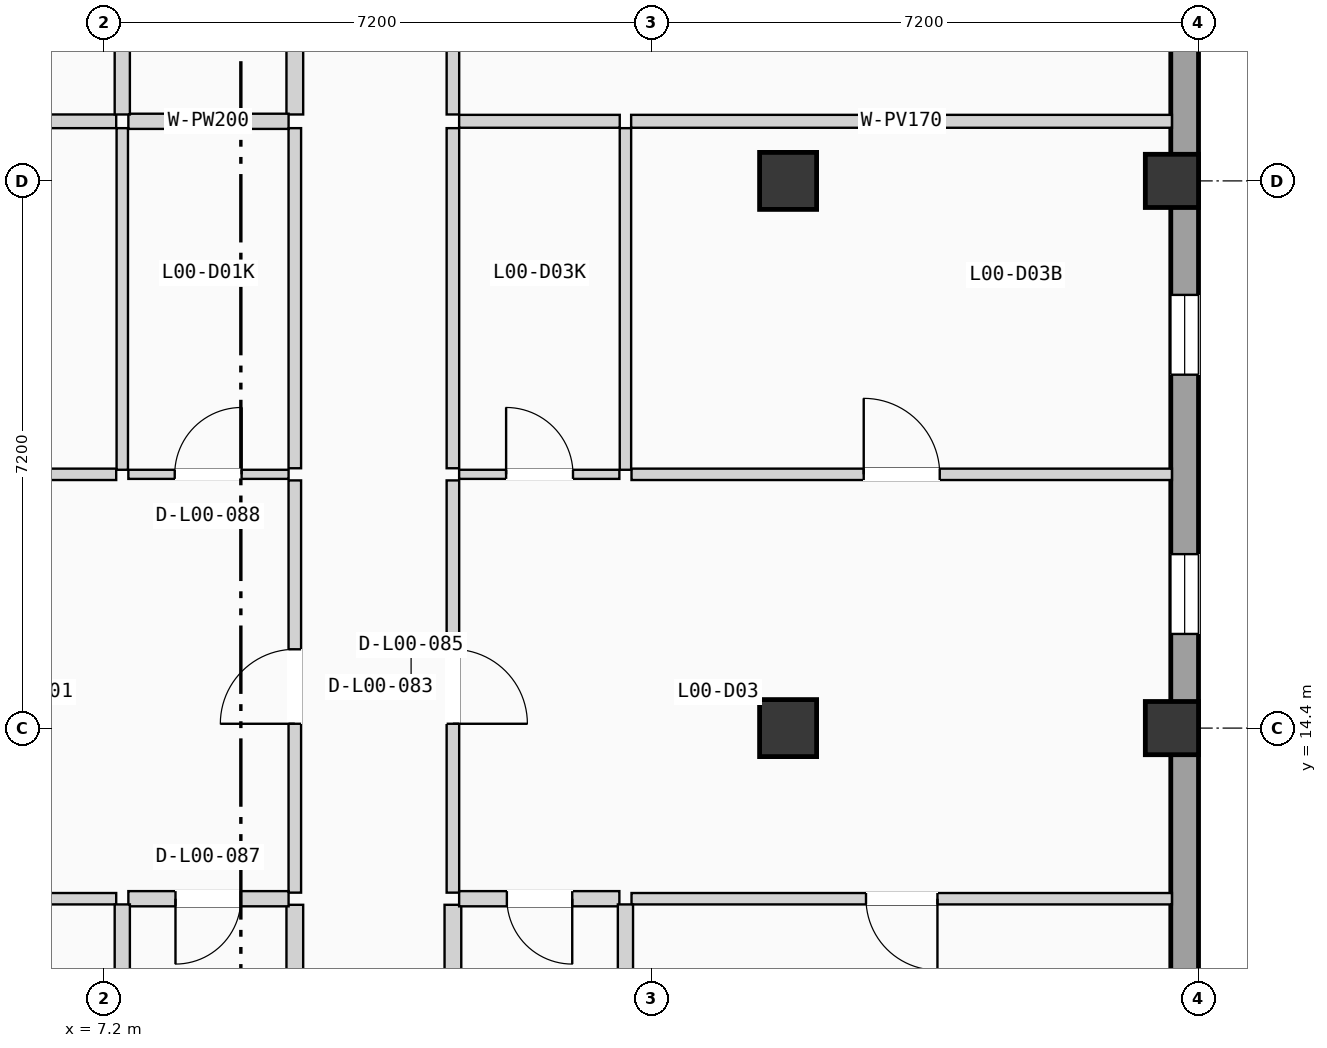
"""IFC4 building model, lengths in metres.
Left out: names, types, materials, properties, quantities, classifications, styles, units other than length and angle.
Written with IfcOpenShell. Run it as: python <this file> out.ifc"""

import sys

from ifc_helpers import new_model, si_unit, direction, frame, frame_2d, origin, origin_2d, place, context, subcontext, project, spatial, rectangle, extrude, element, fill, save


model = new_model("IFC4")
c1 = context("Model", 3, precision=1e-05, world=origin(), true_north=direction((0.0, 1.0)))
c2 = subcontext(c1, "Body", "Model", "MODEL_VIEW")
j1 = project(units=[si_unit("LENGTHUNIT", "METRE"), si_unit("PLANEANGLEUNIT", "RADIAN")], contexts=[c1])
p1 = place(None, origin())
s1 = spatial("IfcSite", under=j1, at=p1, CompositionType="ELEMENT")
p2 = place(p1, origin())
s2 = spatial("IfcBuilding", under=s1, at=p2, CompositionType="ELEMENT")
p3 = place(p2, origin())
s3 = spatial("IfcBuildingStorey", under=s2, at=p3, CompositionType="ELEMENT", Elevation=0.0)
for number, where, z_axis, x_axis in (
    (1, (16.2, 14.4, 0.0), (0.0, 0.0, 1.0), (1.0, 0.0, 0.0)),
    (2, (16.2, 21.6, 0.0), (0.0, 0.0, 1.0), (1.0, 0.0, 0.0)),
):
    element("IfcColumn", number, at=place(p3, frame(where, z_axis=z_axis, x_axis=x_axis)), inside=s3, PredefinedType="COLUMN", context=c2, shape_type="SweptSolid", body=[
        extrude(rectangle(XDim=0.75, YDim=0.75, at=origin_2d()), origin(), (0.0, 0.0, 1.0), 4.9),
    ])
for number, where, z_axis, x_axis in (
    (3, (21.25, 14.4, 0.0), (0.0, 0.0, 1.0), (1.0, 0.0, 0.0)),
    (4, (21.25, 21.6, 0.0), (0.0, 0.0, 1.0), (1.0, 0.0, 0.0)),
):
    element("IfcColumn", number, at=place(p3, frame(where, z_axis=z_axis, x_axis=x_axis)), inside=s3, PredefinedType="COLUMN", context=c2, shape_type="SweptSolid", body=[
        extrude(rectangle(XDim=0.7, YDim=0.7, at=origin_2d()), origin(), (0.0, 0.0, 1.0), 4.9),
    ])
p4 = place(p3, frame((21.417, 0.365, 0.0), z_axis=(0.0, 0.0, 1.0), x_axis=(0.0, 1.0, 0.0)))
e5 = element("IfcWall", 5, at=p4, inside=s3, PredefinedType="SOLIDWALL", context=c2, shape_type="SweptSolid", body=[
    extrude(rectangle(XDim=49.67, YDim=0.365, at=frame_2d((24.835, 0.0))), origin(), (0.0, 0.0, 1.0), 4.64),
])
p5 = place(p4, frame((23.935, 0.0, 0.0)))
e6 = element("IfcOpeningElement", 6, at=p5, cuts=e5, PredefinedType="OPENING", context=c2, shape_type="SweptSolid", body=[
    extrude(rectangle(XDim=1.8, YDim=2.35, at=frame_2d((0.9, 1.175))), frame((0.0, 0.192, 0.0), z_axis=(0.0, -1.0, 0.0), x_axis=(1.0, 0.0, 0.0)), (0.0, 0.0, 1.0), 0.385),
])
p6 = place(p4, frame((15.274, 0.0, 0.9)))
e7 = element("IfcOpeningElement", 7, at=p6, cuts=e5, PredefinedType="OPENING", context=c2, shape_type="SweptSolid", body=[
    extrude(rectangle(XDim=1.05, YDim=1.35, at=frame_2d((0.525, 0.675))), frame((0.0, 0.192, 0.0), z_axis=(0.0, -1.0, 0.0), x_axis=(1.0, 0.0, 0.0)), (0.0, 0.0, 1.0), 0.385),
])
p7 = place(p4, frame((8.947, 0.0, 0.9)))
e8 = element("IfcOpeningElement", 8, at=p7, cuts=e5, PredefinedType="OPENING", context=c2, shape_type="SweptSolid", body=[
    extrude(rectangle(XDim=1.05, YDim=1.5, at=frame_2d((0.525, 0.75))), frame((0.0, 0.192, 0.0), z_axis=(0.0, -1.0, 0.0), x_axis=(1.0, 0.0, 0.0)), (0.0, 0.0, 1.0), 0.385),
])
p8 = place(p4, frame((18.685, 0.0, 0.9)))
e9 = element("IfcOpeningElement", 9, at=p8, cuts=e5, PredefinedType="OPENING", context=c2, shape_type="SweptSolid", body=[
    extrude(rectangle(XDim=1.05, YDim=1.65, at=frame_2d((0.525, 0.825))), frame((0.0, 0.192, 0.0), z_axis=(0.0, -1.0, 0.0), x_axis=(1.0, 0.0, 0.0)), (0.0, 0.0, 1.0), 0.385),
])
p9 = place(p3, frame((9.71, 12.235, 0.0), z_axis=(0.0, 0.0, 1.0), x_axis=(0.0, 1.0, 0.0)))
e10 = element("IfcWall", 10, at=p9, inside=s3, PredefinedType="PARTITIONING", context=c2, shape_type="SweptSolid", body=[
    extrude(rectangle(XDim=5.424, YDim=0.165, at=frame_2d((2.712, 0.0))), origin(), (0.0, 0.0, 1.0), 3.84),
])
p10 = place(p9, frame((2.222, 0.0, 0.0)))
e11 = element("IfcOpeningElement", 11, at=p10, cuts=e10, PredefinedType="OPENING", context=c2, shape_type="SweptSolid", body=[
    extrude(rectangle(XDim=0.98, YDim=2.08, at=frame_2d((0.49, 1.04))), frame((0.0, 0.093, 0.0), z_axis=(0.0, -1.0, 0.0), x_axis=(1.0, 0.0, 0.0)), (0.0, 0.0, 1.0), 0.185),
])
p11 = place(p3, frame((9.71, 7.6, 0.0), z_axis=(0.0, 0.0, 1.0), x_axis=(0.0, 1.0, 0.0)))
e12 = element("IfcWall", 12, at=p11, inside=s3, PredefinedType="PLUMBINGWALL", context=c2, shape_type="SweptSolid", body=[
    extrude(rectangle(XDim=4.475, YDim=0.22, at=frame_2d((2.237, 0.0))), origin(), (0.0, 0.0, 1.0), 3.84),
])
p12 = place(p3, frame((9.71, 17.819, 0.0), z_axis=(0.0, 0.0, 1.0), x_axis=(0.0, 1.0, 0.0)))
e13 = element("IfcWall", 13, at=p12, inside=s3, PredefinedType="PARTITIONING", context=c2, shape_type="SweptSolid", body=[
    extrude(rectangle(XDim=4.475, YDim=0.165, at=frame_2d((2.237, 0.0))), origin(), (0.0, 0.0, 1.0), 3.84),
])
p13 = place(p3, frame((9.71, 22.474, 0.0), z_axis=(0.0, 0.0, 1.0), x_axis=(0.0, 1.0, 0.0)))
e14 = element("IfcWall", 14, at=p13, inside=s3, PredefinedType="PLUMBINGWALL", context=c2, shape_type="SweptSolid", body=[
    extrude(rectangle(XDim=7.196, YDim=0.22, at=frame_2d((3.598, 0.0))), origin(), (0.0, 0.0, 1.0), 3.84),
])
p14 = place(p3, frame((11.79, 12.235, 0.0), z_axis=(0.0, 0.0, 1.0), x_axis=(0.0, 1.0, 0.0)))
e15 = element("IfcWall", 15, at=p14, inside=s3, PredefinedType="PARTITIONING", context=c2, shape_type="SweptSolid", body=[
    extrude(rectangle(XDim=5.424, YDim=0.165, at=frame_2d((2.712, 0.0))), origin(), (0.0, 0.0, 1.0), 3.84),
])
p15 = place(p14, frame((2.222, 0.0, 0.0)))
e16 = element("IfcOpeningElement", 16, at=p15, cuts=e15, PredefinedType="OPENING", context=c2, shape_type="SweptSolid", body=[
    extrude(rectangle(XDim=0.98, YDim=2.08, at=frame_2d((0.49, 1.04))), frame((0.0, 0.093, 0.0), z_axis=(0.0, -1.0, 0.0), x_axis=(1.0, 0.0, 0.0)), (0.0, 0.0, 1.0), 0.185),
])
p16 = place(p3, frame((11.79, 7.575, 0.0), z_axis=(0.0, 0.0, 1.0), x_axis=(0.0, 1.0, 0.0)))
e17 = element("IfcWall", 17, at=p16, inside=s3, PredefinedType="PLUMBINGWALL", context=c2, shape_type="SweptSolid", body=[
    extrude(rectangle(XDim=4.5, YDim=0.22, at=frame_2d((2.25, 0.0))), origin(), (0.0, 0.0, 1.0), 3.84),
])
p17 = place(p3, frame((11.79, 17.819, 0.0), z_axis=(0.0, 0.0, 1.0), x_axis=(0.0, 1.0, 0.0)))
e18 = element("IfcWall", 18, at=p17, inside=s3, PredefinedType="PARTITIONING", context=c2, shape_type="SweptSolid", body=[
    extrude(rectangle(XDim=4.475, YDim=0.165, at=frame_2d((2.237, 0.0))), origin(), (0.0, 0.0, 1.0), 3.84),
])
p18 = place(p3, frame((11.79, 22.474, 0.0), z_axis=(0.0, 0.0, 1.0), x_axis=(0.0, 1.0, 0.0)))
e19 = element("IfcWall", 19, at=p18, inside=s3, PredefinedType="PARTITIONING", context=c2, shape_type="SweptSolid", body=[
    extrude(rectangle(XDim=20.326, YDim=0.165, at=frame_2d((10.163, 0.0))), origin(), (0.0, 0.0, 1.0), 3.84),
])
p19 = place(p18, frame((9.673, 0.0, 0.0)))
e20 = element("IfcOpeningElement", 20, at=p19, cuts=e19, PredefinedType="OPENING", context=c2, shape_type="SweptSolid", body=[
    extrude(rectangle(XDim=0.98, YDim=2.08, at=frame_2d((0.49, 1.04))), frame((0.0, 0.093, 0.0), z_axis=(0.0, -1.0, 0.0), x_axis=(1.0, 0.0, 0.0)), (0.0, 0.0, 1.0), 0.185),
])
p20 = place(p3, frame((7.52, 12.155, 0.0), z_axis=(0.0, 0.0, 1.0), x_axis=(1.0, 0.0, 0.0)))
e21 = element("IfcWall", 21, at=p20, inside=s3, PredefinedType="PLUMBINGWALL", context=c2, shape_type="SweptSolid", body=[
    extrude(rectangle(XDim=2.108, YDim=0.2, at=frame_2d((1.054, 0.0))), origin(), (0.0, 0.0, 1.0), 3.84),
])
p21 = place(p20, frame((0.62, 0.0, 0.0)))
e22 = element("IfcOpeningElement", 22, at=p21, cuts=e21, PredefinedType="OPENING", context=c2, shape_type="SweptSolid", body=[
    extrude(rectangle(XDim=0.86, YDim=2.0, at=frame_2d((0.43, 1.0))), frame((0.0, 0.11, 0.0), z_axis=(0.0, -1.0, 0.0), x_axis=(1.0, 0.0, 0.0)), (0.0, 0.0, 1.0), 0.22),
])
p22 = place(p3, frame((7.52, 17.739, 0.0), z_axis=(0.0, 0.0, 1.0), x_axis=(1.0, 0.0, 0.0)))
e23 = element("IfcWall", 23, at=p22, inside=s3, PredefinedType="PARTITIONING", context=c2, shape_type="SweptSolid", body=[
    extrude(rectangle(XDim=2.108, YDim=0.12, at=frame_2d((1.054, 0.0))), origin(), (0.0, 0.0, 1.0), 3.84),
])
p23 = place(p22, frame((0.61, 0.0, 0.0)))
e24 = element("IfcOpeningElement", 24, at=p23, cuts=e23, PredefinedType="OPENING", context=c2, shape_type="SweptSolid", body=[
    extrude(rectangle(XDim=0.88, YDim=2.02, at=frame_2d((0.44, 1.01))), frame((0.0, 0.07, 0.0), z_axis=(0.0, -1.0, 0.0), x_axis=(1.0, 0.0, 0.0)), (0.0, 0.0, 1.0), 0.14),
])
p24 = place(p3, frame((0.35, 12.155, 0.0), z_axis=(0.0, 0.0, 1.0), x_axis=(1.0, 0.0, 0.0)))
e25 = element("IfcWall", 25, at=p24, inside=s3, PredefinedType="PARTITIONING", context=c2, shape_type="SweptSolid", body=[
    extrude(rectangle(XDim=7.01, YDim=0.15, at=frame_2d((3.505, 0.0))), origin(), (0.0, 0.0, 1.0), 3.84),
])
p25 = place(p24, frame((3.005, 0.0, 0.0)))
e26 = element("IfcOpeningElement", 26, at=p25, cuts=e25, PredefinedType="OPENING", context=c2, shape_type="SweptSolid", body=[
    extrude(rectangle(XDim=1.0, YDim=2.06, at=frame_2d((0.5, 1.03))), frame((0.0, 0.085, 0.0), z_axis=(0.0, -1.0, 0.0), x_axis=(1.0, 0.0, 0.0)), (0.0, 0.0, 1.0), 0.17),
])
p26 = place(p3, frame((0.35, 17.739, 0.0), z_axis=(0.0, 0.0, 1.0), x_axis=(1.0, 0.0, 0.0)))
e27 = element("IfcWall", 27, at=p26, inside=s3, PredefinedType="PARTITIONING", context=c2, shape_type="SweptSolid", body=[
    extrude(rectangle(XDim=7.01, YDim=0.15, at=frame_2d((3.505, 0.0))), origin(), (0.0, 0.0, 1.0), 3.84),
])
p27 = place(p26, frame((2.985, 0.0, 0.0)))
e28 = element("IfcOpeningElement", 28, at=p27, cuts=e27, PredefinedType="OPENING", context=c2, shape_type="SweptSolid", body=[
    extrude(rectangle(XDim=1.04, YDim=2.08, at=frame_2d((0.52, 1.04))), frame((0.0, 0.085, 0.0), z_axis=(0.0, -1.0, 0.0), x_axis=(1.0, 0.0, 0.0)), (0.0, 0.0, 1.0), 0.17),
])
p28 = place(p3, frame((7.44, 7.6, 0.0), z_axis=(0.0, 0.0, 1.0), x_axis=(0.0, 1.0, 0.0)))
e29 = element("IfcWall", 29, at=p28, inside=s3, PredefinedType="PLUMBINGWALL", context=c2, shape_type="SweptSolid", body=[
    extrude(rectangle(XDim=4.48, YDim=0.2, at=frame_2d((2.24, 0.0))), origin(), (0.0, 0.0, 1.0), 3.84),
])
p29 = place(p3, frame((7.44, 17.799, 0.0), z_axis=(0.0, 0.0, 1.0), x_axis=(0.0, 1.0, 0.0)))
e30 = element("IfcWall", 30, at=p29, inside=s3, PredefinedType="PARTITIONING", context=c2, shape_type="SweptSolid", body=[
    extrude(rectangle(XDim=4.495, YDim=0.15, at=frame_2d((2.248, 0.0))), origin(), (0.0, 0.0, 1.0), 3.84),
])
p30 = place(p3, frame((7.52, 22.384, 0.0), z_axis=(0.0, 0.0, 1.0), x_axis=(1.0, 0.0, 0.0)))
e31 = element("IfcWall", 31, at=p30, inside=s3, PredefinedType="PLUMBINGWALL", context=c2, shape_type="SweptSolid", body=[
    extrude(rectangle(XDim=2.108, YDim=0.2, at=frame_2d((1.054, 0.0))), origin(), (0.0, 0.0, 1.0), 3.84),
])
p31 = place(p3, frame((5.11, 22.384, 0.0), z_axis=(0.0, 0.0, 1.0), x_axis=(1.0, 0.0, 0.0)))
e32 = element("IfcWall", 32, at=p31, inside=s3, PredefinedType="PARTITIONING", context=c2, shape_type="SweptSolid", body=[
    extrude(rectangle(XDim=2.25, YDim=0.18, at=frame_2d((1.125, 0.0))), origin(), (0.0, 0.0, 1.0), 3.84),
])
p32 = place(p3, frame((7.44, 22.474, 0.0), z_axis=(0.0, 0.0, 1.0), x_axis=(0.0, 1.0, 0.0)))
e33 = element("IfcWall", 33, at=p32, inside=s3, PredefinedType="PLUMBINGWALL", context=c2, shape_type="SweptSolid", body=[
    extrude(rectangle(XDim=7.216, YDim=0.2, at=frame_2d((3.608, 0.0))), origin(), (0.0, 0.0, 1.0), 3.84),
])
p33 = place(p32, frame((3.173, 0.0, 0.0)))
e34 = element("IfcOpeningElement", 34, at=p33, cuts=e33, PredefinedType="OPENING", context=c2, shape_type="SweptSolid", body=[
    extrude(rectangle(XDim=0.85, YDim=2.01, at=frame_2d((0.425, 1.005))), frame((0.0, 0.11, 0.0), z_axis=(0.0, -1.0, 0.0), x_axis=(1.0, 0.0, 0.0)), (0.0, 0.0, 1.0), 0.22),
])
p34 = place(p3, frame((11.872, 12.155, 0.0), z_axis=(0.0, 0.0, 1.0), x_axis=(1.0, 0.0, 0.0)))
e35 = element("IfcWall", 35, at=p34, inside=s3, PredefinedType="PLUMBINGWALL", context=c2, shape_type="SweptSolid", body=[
    extrude(rectangle(XDim=2.108, YDim=0.2, at=frame_2d((1.054, 0.0))), origin(), (0.0, 0.0, 1.0), 3.84),
])
p35 = place(p34, frame((0.628, 0.0, 0.0)))
e36 = element("IfcOpeningElement", 36, at=p35, cuts=e35, PredefinedType="OPENING", context=c2, shape_type="SweptSolid", body=[
    extrude(rectangle(XDim=0.86, YDim=2.0, at=frame_2d((0.43, 1.0))), frame((0.0, 0.11, 0.0), z_axis=(0.0, -1.0, 0.0), x_axis=(1.0, 0.0, 0.0)), (0.0, 0.0, 1.0), 0.22),
])
p36 = place(p3, frame((11.872, 17.739, 0.0), z_axis=(0.0, 0.0, 1.0), x_axis=(1.0, 0.0, 0.0)))
e37 = element("IfcWall", 37, at=p36, inside=s3, PredefinedType="PARTITIONING", context=c2, shape_type="SweptSolid", body=[
    extrude(rectangle(XDim=2.108, YDim=0.12, at=frame_2d((1.054, 0.0))), origin(), (0.0, 0.0, 1.0), 3.84),
])
p37 = place(p36, frame((0.618, 0.0, 0.0)))
e38 = element("IfcOpeningElement", 38, at=p37, cuts=e37, PredefinedType="OPENING", context=c2, shape_type="SweptSolid", body=[
    extrude(rectangle(XDim=0.88, YDim=2.02, at=frame_2d((0.44, 1.01))), frame((0.0, 0.07, 0.0), z_axis=(0.0, -1.0, 0.0), x_axis=(1.0, 0.0, 0.0)), (0.0, 0.0, 1.0), 0.14),
])
p38 = place(p3, frame((14.14, 12.155, 0.0), z_axis=(0.0, 0.0, 1.0), x_axis=(1.0, 0.0, 0.0)))
e39 = element("IfcWall", 39, at=p38, inside=s3, PredefinedType="PARTITIONING", context=c2, shape_type="SweptSolid", body=[
    extrude(rectangle(XDim=7.11, YDim=0.15, at=frame_2d((3.555, 0.0))), origin(), (0.0, 0.0, 1.0), 3.84),
])
p39 = place(p38, frame((3.085, 0.0, 0.0)))
e40 = element("IfcOpeningElement", 40, at=p39, cuts=e39, PredefinedType="OPENING", context=c2, shape_type="SweptSolid", body=[
    extrude(rectangle(XDim=0.94, YDim=2.06, at=frame_2d((0.47, 1.03))), frame((0.0, 0.085, 0.0), z_axis=(0.0, -1.0, 0.0), x_axis=(1.0, 0.0, 0.0)), (0.0, 0.0, 1.0), 0.17),
])
p40 = place(p3, frame((14.14, 17.739, 0.0), z_axis=(0.0, 0.0, 1.0), x_axis=(1.0, 0.0, 0.0)))
e41 = element("IfcWall", 41, at=p40, inside=s3, PredefinedType="PARTITIONING", context=c2, shape_type="SweptSolid", body=[
    extrude(rectangle(XDim=7.11, YDim=0.15, at=frame_2d((3.555, 0.0))), origin(), (0.0, 0.0, 1.0), 3.84),
])
p41 = place(p40, frame((3.055, 0.0, 0.0)))
e42 = element("IfcOpeningElement", 42, at=p41, cuts=e41, PredefinedType="OPENING", context=c2, shape_type="SweptSolid", body=[
    extrude(rectangle(XDim=1.0, YDim=2.06, at=frame_2d((0.5, 1.03))), frame((0.0, 0.085, 0.0), z_axis=(0.0, -1.0, 0.0), x_axis=(1.0, 0.0, 0.0)), (0.0, 0.0, 1.0), 0.17),
])
p42 = place(p3, frame((14.06, 7.575, 0.0), z_axis=(0.0, 0.0, 1.0), x_axis=(0.0, 1.0, 0.0)))
e43 = element("IfcWall", 43, at=p42, inside=s3, PredefinedType="PLUMBINGWALL", context=c2, shape_type="SweptSolid", body=[
    extrude(rectangle(XDim=4.505, YDim=0.2, at=frame_2d((2.252, 0.0))), origin(), (0.0, 0.0, 1.0), 3.84),
])
p43 = place(p3, frame((14.06, 17.799, 0.0), z_axis=(0.0, 0.0, 1.0), x_axis=(0.0, 1.0, 0.0)))
e44 = element("IfcWall", 44, at=p43, inside=s3, PredefinedType="PARTITIONING", context=c2, shape_type="SweptSolid", body=[
    extrude(rectangle(XDim=4.495, YDim=0.15, at=frame_2d((2.248, 0.0))), origin(), (0.0, 0.0, 1.0), 3.84),
])
p44 = place(p3, frame((11.872, 22.384, 0.0), z_axis=(0.0, 0.0, 1.0), x_axis=(1.0, 0.0, 0.0)))
e45 = element("IfcWall", 45, at=p44, inside=s3, PredefinedType="PARTITIONING", context=c2, shape_type="SweptSolid", body=[
    extrude(rectangle(XDim=2.113, YDim=0.17, at=frame_2d((1.057, 0.0))), origin(), (0.0, 0.0, 1.0), 3.84),
])
p45 = place(p3, frame((14.135, 22.384, 0.0), z_axis=(0.0, 0.0, 1.0), x_axis=(1.0, 0.0, 0.0)))
e46 = element("IfcWall", 46, at=p45, inside=s3, PredefinedType="PARTITIONING", context=c2, shape_type="SweptSolid", body=[
    extrude(rectangle(XDim=7.115, YDim=0.17, at=frame_2d((3.558, 0.0))), origin(), (0.0, 0.0, 1.0), 3.84),
])
p46 = place(p6, origin())
e47 = element("IfcWindow", 47, at=p46, inside=s3, PartitioningType="SINGLE_PANEL", PredefinedType="WINDOW", context=c2, shape_type="SweptSolid", body=[
    extrude(rectangle(XDim=1.05, YDim=1.35, at=frame_2d((0.525, 0.675))), frame((0.0, 0.03, 0.0), z_axis=(0.0, -1.0, 0.0), x_axis=(1.0, 0.0, 0.0)), (0.0, 0.0, 1.0), 0.06),
])
fill(e7, e47)
p47 = place(p8, origin())
e48 = element("IfcWindow", 48, at=p47, inside=s3, PartitioningType="SINGLE_PANEL", PredefinedType="WINDOW", context=c2, shape_type="SweptSolid", body=[
    extrude(rectangle(XDim=1.05, YDim=1.65, at=frame_2d((0.525, 0.825))), frame((0.0, 0.03, 0.0), z_axis=(0.0, -1.0, 0.0), x_axis=(1.0, 0.0, 0.0)), (0.0, 0.0, 1.0), 0.06),
])
fill(e9, e48)
p48 = place(p10, origin())
e49 = element("IfcDoor", 49, at=p48, inside=s3, OperationType="SINGLE_SWING_LEFT", PredefinedType="DOOR", context=c2, shape_type="SweptSolid", body=[
    extrude(rectangle(XDim=0.98, YDim=2.08, at=frame_2d((0.49, 1.04))), frame((0.0, 0.025, 0.0), z_axis=(0.0, -1.0, 0.0), x_axis=(1.0, 0.0, 0.0)), (0.0, 0.0, 1.0), 0.05),
])
fill(e11, e49)
p49 = place(p15, frame((0.98, 0.0, 0.0), z_axis=(0.0, 0.0, 1.0), x_axis=(-1.0, 0.0, 0.0)))
e50 = element("IfcDoor", 50, at=p49, inside=s3, OperationType="SINGLE_SWING_LEFT", PredefinedType="DOOR", context=c2, shape_type="SweptSolid", body=[
    extrude(rectangle(XDim=0.98, YDim=2.08, at=frame_2d((0.49, 1.04))), frame((0.0, 0.025, 0.0), z_axis=(0.0, -1.0, 0.0), x_axis=(1.0, 0.0, 0.0)), (0.0, 0.0, 1.0), 0.05),
])
fill(e16, e50)
p50 = place(p21, frame((0.86, 0.0, 0.0), z_axis=(0.0, 0.0, 1.0), x_axis=(-1.0, 0.0, 0.0)))
e51 = element("IfcDoor", 51, at=p50, inside=s3, OperationType="SINGLE_SWING_LEFT", PredefinedType="DOOR", context=c2, shape_type="SweptSolid", body=[
    extrude(rectangle(XDim=0.86, YDim=2.0, at=frame_2d((0.43, 1.0))), frame((0.0, 0.025, 0.0), z_axis=(0.0, -1.0, 0.0), x_axis=(1.0, 0.0, 0.0)), (0.0, 0.0, 1.0), 0.05),
])
fill(e22, e51)
p51 = place(p23, origin())
e52 = element("IfcDoor", 52, at=p51, inside=s3, OperationType="SINGLE_SWING_RIGHT", PredefinedType="DOOR", context=c2, shape_type="SweptSolid", body=[
    extrude(rectangle(XDim=0.88, YDim=2.02, at=frame_2d((0.44, 1.01))), frame((0.0, 0.025, 0.0), z_axis=(0.0, -1.0, 0.0), x_axis=(1.0, 0.0, 0.0)), (0.0, 0.0, 1.0), 0.05),
])
fill(e24, e52)
p52 = place(p35, frame((0.86, 0.0, 0.0), z_axis=(0.0, 0.0, 1.0), x_axis=(-1.0, 0.0, 0.0)))
e53 = element("IfcDoor", 53, at=p52, inside=s3, OperationType="SINGLE_SWING_RIGHT", PredefinedType="DOOR", context=c2, shape_type="SweptSolid", body=[
    extrude(rectangle(XDim=0.86, YDim=2.0, at=frame_2d((0.43, 1.0))), frame((0.0, 0.025, 0.0), z_axis=(0.0, -1.0, 0.0), x_axis=(1.0, 0.0, 0.0)), (0.0, 0.0, 1.0), 0.05),
])
fill(e36, e53)
p53 = place(p37, origin())
e54 = element("IfcDoor", 54, at=p53, inside=s3, OperationType="SINGLE_SWING_LEFT", PredefinedType="DOOR", context=c2, shape_type="SweptSolid", body=[
    extrude(rectangle(XDim=0.88, YDim=2.02, at=frame_2d((0.44, 1.01))), frame((0.0, 0.025, 0.0), z_axis=(0.0, -1.0, 0.0), x_axis=(1.0, 0.0, 0.0)), (0.0, 0.0, 1.0), 0.05),
])
fill(e38, e54)
p54 = place(p39, frame((0.94, 0.0, 0.0), z_axis=(0.0, 0.0, 1.0), x_axis=(-1.0, 0.0, 0.0)))
e55 = element("IfcDoor", 55, at=p54, inside=s3, OperationType="SINGLE_SWING_RIGHT", PredefinedType="DOOR", context=c2, shape_type="SweptSolid", body=[
    extrude(rectangle(XDim=0.94, YDim=2.06, at=frame_2d((0.47, 1.03))), frame((0.0, 0.025, 0.0), z_axis=(0.0, -1.0, 0.0), x_axis=(1.0, 0.0, 0.0)), (0.0, 0.0, 1.0), 0.05),
])
fill(e40, e55)
p55 = place(p41, origin())
e56 = element("IfcDoor", 56, at=p55, inside=s3, OperationType="SINGLE_SWING_LEFT", PredefinedType="DOOR", context=c2, shape_type="SweptSolid", body=[
    extrude(rectangle(XDim=1.0, YDim=2.06, at=frame_2d((0.5, 1.03))), frame((0.0, 0.025, 0.0), z_axis=(0.0, -1.0, 0.0), x_axis=(1.0, 0.0, 0.0)), (0.0, 0.0, 1.0), 0.05),
])
fill(e42, e56)
save(model, sys.argv[1])
